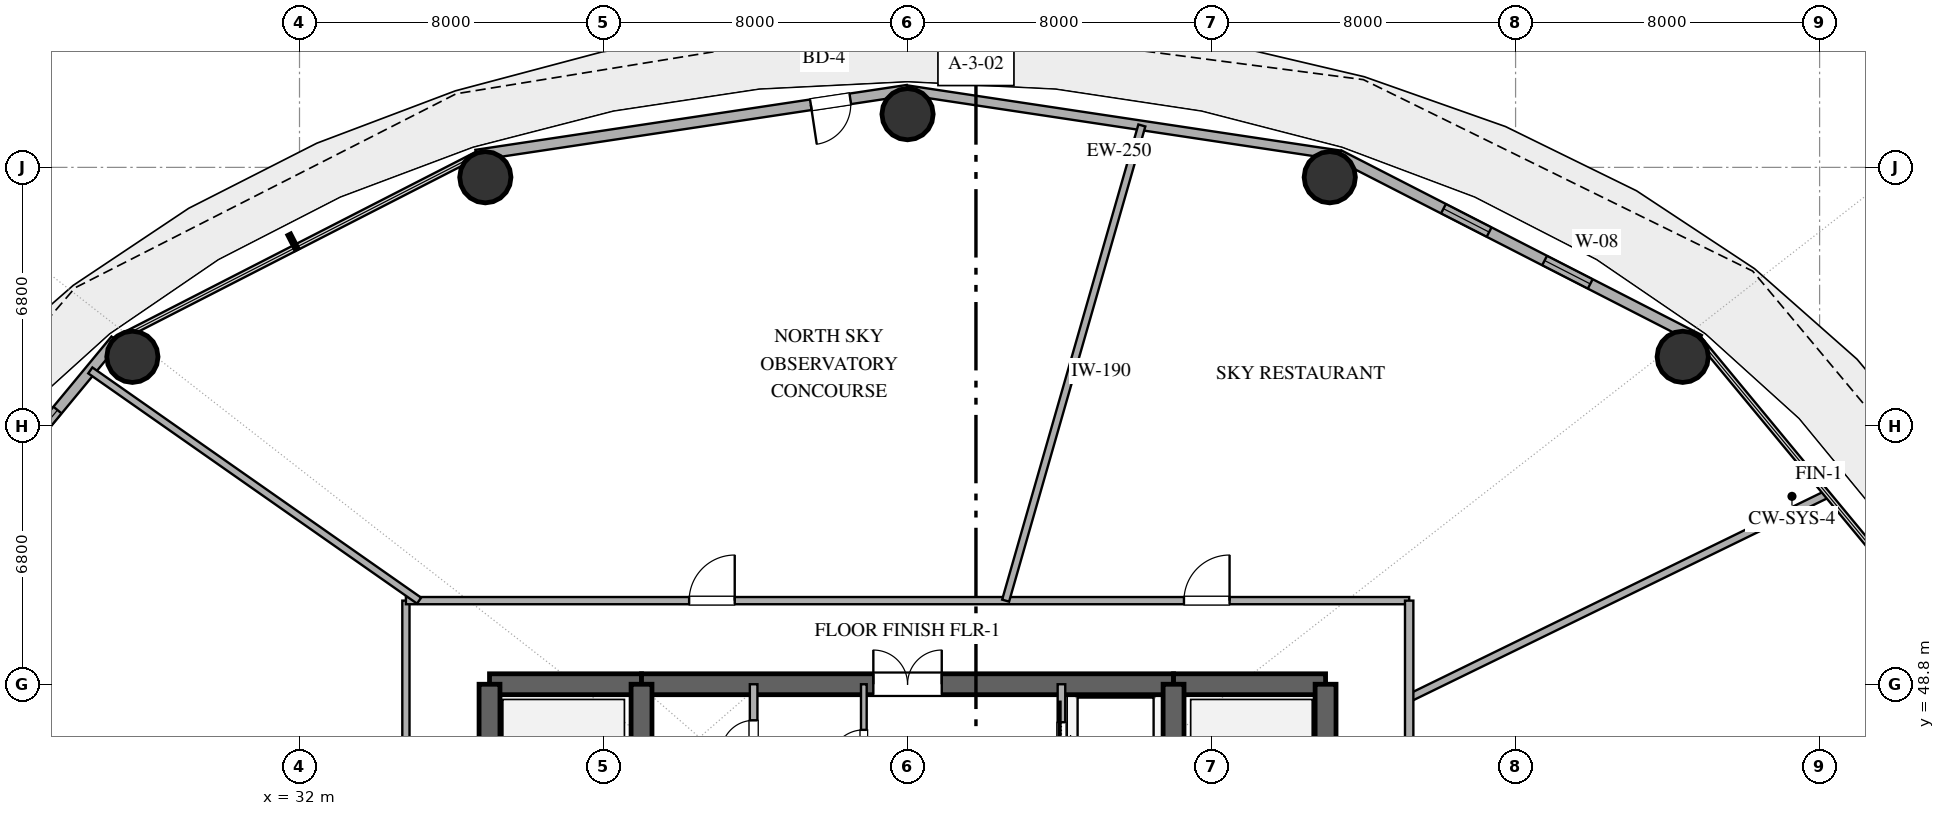
"""IFC4 building model, lengths in metres.
Left out: names, types, materials, properties, quantities, classifications, styles, units other than length and angle.
Written with IfcOpenShell. Run it as: python <this file> out.ifc"""

import sys

from ifc_helpers import new_model, si_unit, direction, frame, frame_2d, origin, origin_2d, place, context, subcontext, project, spatial, rectangle, hollow_circle, extrude, element, fill, save


model = new_model("IFC4")
c1 = context("Model", 3, precision=1e-05, world=origin(), true_north=direction((0.0, 1.0)))
c2 = subcontext(c1, "Body", "Model", "MODEL_VIEW")
j1 = project(units=[si_unit("LENGTHUNIT", "METRE"), si_unit("PLANEANGLEUNIT", "RADIAN")], contexts=[c1])
p1 = place(None, origin())
s1 = spatial("IfcSite", under=j1, at=p1, CompositionType="ELEMENT")
p2 = place(p1, origin())
s2 = spatial("IfcBuilding", under=s1, at=p2, CompositionType="ELEMENT")
p3 = place(p2, frame((0.0, 0.0, 134.4)))
s3 = spatial("IfcBuildingStorey", under=s2, at=p3, CompositionType="ELEMENT", Elevation=134.4)
p4 = place(p3, frame((37.0, 48.8, 0.0), z_axis=(0.0, 0.0, 1.0), x_axis=(1.0, 0.0, 0.0)))
e1 = element("IfcWall", 1, at=p4, inside=s3, PredefinedType="SHEAR", context=c2, shape_type="SweptSolid", body=[
    extrude(rectangle(XDim=4.0, YDim=0.55, at=frame_2d((2.0, 0.0))), origin(), (0.0, 0.0, 1.0), 5.05),
])
p5 = place(p3, frame((41.0, 48.8, 0.0), z_axis=(0.0, 0.0, 1.0), x_axis=(1.0, 0.0, 0.0)))
e2 = element("IfcWall", 2, at=p5, inside=s3, PredefinedType="SHEAR", context=c2, shape_type="SweptSolid", body=[
    extrude(rectangle(XDim=14.0, YDim=0.55, at=frame_2d((7.0, 0.0))), origin(), (0.0, 0.0, 1.0), 5.05),
])
p6 = place(p5, frame((6.1, 0.0, 0.0)))
e3 = element("IfcOpeningElement", 3, at=p6, cuts=e2, PredefinedType="OPENING", context=c2, shape_type="SweptSolid", body=[
    extrude(rectangle(XDim=1.8, YDim=2.25, at=frame_2d((0.9, 1.125))), frame((0.0, 0.285, 0.0), z_axis=(0.0, -1.0, 0.0), x_axis=(1.0, 0.0, 0.0)), (0.0, 0.0, 1.0), 0.57),
])
p7 = place(p3, frame((55.0, 48.8, 0.0), z_axis=(0.0, 0.0, 1.0), x_axis=(1.0, 0.0, 0.0)))
e4 = element("IfcWall", 4, at=p7, inside=s3, PredefinedType="SHEAR", context=c2, shape_type="SweptSolid", body=[
    extrude(rectangle(XDim=4.0, YDim=0.55, at=frame_2d((2.0, 0.0))), origin(), (0.0, 0.0, 1.0), 5.05),
])
p8 = place(p3, frame((37.0, 35.2, 0.0), z_axis=(0.0, 0.0, 1.0), x_axis=(0.0, 1.0, 0.0)))
e5 = element("IfcWall", 5, at=p8, inside=s3, PredefinedType="SHEAR", context=c2, shape_type="SweptSolid", body=[
    extrude(rectangle(XDim=13.6, YDim=0.55, at=frame_2d((6.8, 0.0))), origin(), (0.0, 0.0, 1.0), 5.05),
])
p9 = place(p8, frame((1.5, 0.0, 0.0)))
e6 = element("IfcOpeningElement", 6, at=p9, cuts=e5, PredefinedType="OPENING", context=c2, shape_type="SweptSolid", body=[
    extrude(rectangle(XDim=1.2, YDim=2.15, at=frame_2d((0.6, 1.075))), frame((0.0, 0.285, 0.0), z_axis=(0.0, -1.0, 0.0), x_axis=(1.0, 0.0, 0.0)), (0.0, 0.0, 1.0), 0.57),
])
p10 = place(p3, frame((59.0, 35.2, 0.0), z_axis=(0.0, 0.0, 1.0), x_axis=(0.0, 1.0, 0.0)))
e7 = element("IfcWall", 7, at=p10, inside=s3, PredefinedType="SHEAR", context=c2, shape_type="SweptSolid", body=[
    extrude(rectangle(XDim=13.6, YDim=0.55, at=frame_2d((6.8, 0.0))), origin(), (0.0, 0.0, 1.0), 5.05),
])
p11 = place(p10, frame((1.5, 0.0, 0.0)))
e8 = element("IfcOpeningElement", 8, at=p11, cuts=e7, PredefinedType="OPENING", context=c2, shape_type="SweptSolid", body=[
    extrude(rectangle(XDim=1.2, YDim=2.15, at=frame_2d((0.6, 1.075))), frame((0.0, 0.285, 0.0), z_axis=(0.0, -1.0, 0.0), x_axis=(1.0, 0.0, 0.0)), (0.0, 0.0, 1.0), 0.57),
])
p12 = place(p3, frame((41.0, 35.2, 0.0), z_axis=(0.0, 0.0, 1.0), x_axis=(0.0, 1.0, 0.0)))
e9 = element("IfcWall", 9, at=p12, inside=s3, PredefinedType="SHEAR", context=c2, shape_type="SweptSolid", body=[
    extrude(rectangle(XDim=13.6, YDim=0.55, at=frame_2d((6.8, 0.0))), origin(), (0.0, 0.0, 1.0), 5.05),
])
p13 = place(p12, frame((1.15, 0.0, 0.0)))
e10 = element("IfcOpeningElement", 10, at=p13, cuts=e9, PredefinedType="OPENING", context=c2, shape_type="SweptSolid", body=[
    extrude(rectangle(XDim=1.1, YDim=2.2, at=frame_2d((0.55, 1.1))), frame((0.0, 0.285, 0.0), z_axis=(0.0, -1.0, 0.0), x_axis=(1.0, 0.0, 0.0)), (0.0, 0.0, 1.0), 0.57),
])
p14 = place(p3, frame((55.0, 35.2, 0.0), z_axis=(0.0, 0.0, 1.0), x_axis=(0.0, 1.0, 0.0)))
e11 = element("IfcWall", 11, at=p14, inside=s3, PredefinedType="SHEAR", context=c2, shape_type="SweptSolid", body=[
    extrude(rectangle(XDim=13.6, YDim=0.55, at=frame_2d((6.8, 0.0))), origin(), (0.0, 0.0, 1.0), 5.05),
])
p15 = place(p14, frame((1.15, 0.0, 0.0)))
e12 = element("IfcOpeningElement", 12, at=p15, cuts=e11, PredefinedType="OPENING", context=c2, shape_type="SweptSolid", body=[
    extrude(rectangle(XDim=1.1, YDim=2.2, at=frame_2d((0.55, 1.1))), frame((0.0, 0.285, 0.0), z_axis=(0.0, -1.0, 0.0), x_axis=(1.0, 0.0, 0.0)), (0.0, 0.0, 1.0), 0.57),
])
for number, where, z_axis, x_axis in (
    (13, (68.398, 57.415, 0.0), (0.0, 0.0, 1.0), (1.0, 0.0, 0.0)),
    (14, (59.11, 62.141, 0.0), (0.0, 0.0, 1.0), (1.0, 0.0, 0.0)),
    (15, (48.0, 63.8, 0.0), (0.0, 0.0, 1.0), (1.0, 0.0, 0.0)),
    (16, (36.89, 62.141, 0.0), (0.0, 0.0, 1.0), (1.0, 0.0, 0.0)),
    (17, (27.602, 57.415, 0.0), (0.0, 0.0, 1.0), (1.0, 0.0, 0.0)),
):
    element("IfcColumn", number, at=place(p3, frame(where, z_axis=z_axis, x_axis=x_axis)), inside=s3, PredefinedType="COLUMN", context=c2, shape_type="SweptSolid", body=[
        extrude(hollow_circle(Radius=0.675, WallThickness=0.036, at=origin_2d()), origin(), (0.0, 0.0, 1.0), 5.05),
    ])
p16 = place(p3, frame((68.84, 57.86, 0.0), z_axis=(0.0, 0.0, 1.0), x_axis=(-0.889959505023, 0.45603955905, 0.0)))
e18 = element("IfcWall", 18, at=p16, inside=s3, PredefinedType="SOLIDWALL", context=c2, shape_type="SweptSolid", body=[
    extrude(rectangle(XDim=10.662, YDim=0.28, at=frame_2d((5.331, 0.0))), origin(), (0.0, 0.0, 1.0), 5.05),
])
p17 = place(p16, frame((3.231, 0.0, 0.85)))
e19 = element("IfcOpeningElement", 19, at=p17, cuts=e18, PredefinedType="OPENING", context=c2, shape_type="SweptSolid", body=[
    extrude(rectangle(XDim=1.35, YDim=1.8, at=frame_2d((0.675, 0.9))), frame((0.0, 0.15, 0.0), z_axis=(0.0, -1.0, 0.0), x_axis=(1.0, 0.0, 0.0)), (0.0, 0.0, 1.0), 0.3),
])
p18 = place(p16, frame((6.221, 0.0, 0.85)))
e20 = element("IfcOpeningElement", 20, at=p18, cuts=e18, PredefinedType="OPENING", context=c2, shape_type="SweptSolid", body=[
    extrude(rectangle(XDim=1.35, YDim=1.8, at=frame_2d((0.675, 0.9))), frame((0.0, 0.15, 0.0), z_axis=(0.0, -1.0, 0.0), x_axis=(1.0, 0.0, 0.0)), (0.0, 0.0, 1.0), 0.3),
])
p19 = place(p3, frame((59.351, 62.723, 0.0), z_axis=(0.0, 0.0, 1.0), x_axis=(-0.988877774656, 0.148730450117, 0.0)))
e21 = element("IfcWall", 21, at=p19, inside=s3, PredefinedType="SOLIDWALL", context=c2, shape_type="SweptSolid", body=[
    extrude(rectangle(XDim=11.479, YDim=0.25, at=frame_2d((5.74, 0.0))), origin(), (0.0, 0.0, 1.0), 5.05),
])
p20 = place(p3, frame((48.0, 64.43, 0.0), z_axis=(0.0, 0.0, 1.0), x_axis=(-0.988877774656, -0.148730450117, 0.0)))
e22 = element("IfcWall", 22, at=p20, inside=s3, PredefinedType="SOLIDWALL", context=c2, shape_type="SweptSolid", body=[
    extrude(rectangle(XDim=11.479, YDim=0.28, at=frame_2d((5.74, 0.0))), origin(), (0.0, 0.0, 1.0), 5.05),
])
p21 = place(p20, frame((1.524, 0.0, 0.0)))
e23 = element("IfcOpeningElement", 23, at=p21, cuts=e22, PredefinedType="OPENING", context=c2, shape_type="SweptSolid", body=[
    extrude(rectangle(XDim=1.05, YDim=2.2, at=frame_2d((0.525, 1.1))), frame((0.0, 0.15, 0.0), z_axis=(0.0, -1.0, 0.0), x_axis=(1.0, 0.0, 0.0)), (0.0, 0.0, 1.0), 0.3),
])
p22 = place(p3, frame((27.16, 57.86, 0.0), z_axis=(0.0, 0.0, 1.0), x_axis=(-0.637505817448, -0.770445541696, 0.0)))
e24 = element("IfcWall", 24, at=p22, inside=s3, PredefinedType="SOLIDWALL", context=c2, shape_type="SweptSolid", body=[
    extrude(rectangle(XDim=9.445, YDim=0.28, at=frame_2d((4.723, 0.0))), origin(), (0.0, 0.0, 1.0), 5.05),
])
p23 = place(p22, frame((2.396, 0.0, 0.85)))
e25 = element("IfcOpeningElement", 25, at=p23, cuts=e24, PredefinedType="OPENING", context=c2, shape_type="SweptSolid", body=[
    extrude(rectangle(XDim=1.8, YDim=2.2, at=frame_2d((0.9, 1.1))), frame((0.0, 0.15, 0.0), z_axis=(0.0, -1.0, 0.0), x_axis=(1.0, 0.0, 0.0)), (0.0, 0.0, 1.0), 0.3),
])
p24 = place(p22, frame((5.132, 0.0, 0.85)))
e26 = element("IfcOpeningElement", 26, at=p24, cuts=e24, PredefinedType="OPENING", context=c2, shape_type="SweptSolid", body=[
    extrude(rectangle(XDim=1.8, YDim=2.2, at=frame_2d((0.9, 1.1))), frame((0.0, 0.15, 0.0), z_axis=(0.0, -1.0, 0.0), x_axis=(1.0, 0.0, 0.0)), (0.0, 0.0, 1.0), 0.3),
])
p25 = place(p3, frame((43.95, 46.2, 0.0), z_axis=(0.0, 0.0, 1.0), x_axis=(0.0, 1.0, 0.0)))
e27 = element("IfcWall", 27, at=p25, inside=s3, PredefinedType="SOLIDWALL", context=c2, shape_type="SweptSolid", body=[
    extrude(rectangle(XDim=2.6, YDim=0.2, at=frame_2d((1.3, 0.0))), origin(), (0.0, 0.0, 1.0), 4.35),
])
p26 = place(p25, frame((0.8, 0.0, 0.0)))
e28 = element("IfcOpeningElement", 28, at=p26, cuts=e27, PredefinedType="OPENING", context=c2, shape_type="SweptSolid", body=[
    extrude(rectangle(XDim=0.85, YDim=2.15, at=frame_2d((0.425, 1.075))), frame((0.0, 0.11, 0.0), z_axis=(0.0, -1.0, 0.0), x_axis=(1.0, 0.0, 0.0)), (0.0, 0.0, 1.0), 0.22),
])
p27 = place(p3, frame((52.05, 38.4, 0.0), z_axis=(0.0, 0.0, 1.0), x_axis=(0.0, 1.0, 0.0)))
e29 = element("IfcWall", 29, at=p27, inside=s3, PredefinedType="SOLIDWALL", context=c2, shape_type="SweptSolid", body=[
    extrude(rectangle(XDim=10.4, YDim=0.2, at=frame_2d((5.2, 0.0))), origin(), (0.0, 0.0, 1.0), 4.35),
])
p28 = place(p27, frame((0.7, 0.0, 0.0)))
e30 = element("IfcOpeningElement", 30, at=p28, cuts=e29, PredefinedType="OPENING", context=c2, shape_type="SweptSolid", body=[
    extrude(rectangle(XDim=1.1, YDim=2.2, at=frame_2d((0.55, 1.1))), frame((0.0, 0.11, 0.0), z_axis=(0.0, -1.0, 0.0), x_axis=(1.0, 0.0, 0.0)), (0.0, 0.0, 1.0), 0.22),
])
p29 = place(p27, frame((3.2, 0.0, 0.0)))
e31 = element("IfcOpeningElement", 31, at=p29, cuts=e29, PredefinedType="OPENING", context=c2, shape_type="SweptSolid", body=[
    extrude(rectangle(XDim=1.1, YDim=2.2, at=frame_2d((0.55, 1.1))), frame((0.0, 0.11, 0.0), z_axis=(0.0, -1.0, 0.0), x_axis=(1.0, 0.0, 0.0)), (0.0, 0.0, 1.0), 0.22),
])
p30 = place(p27, frame((5.65, 0.0, 0.0)))
e32 = element("IfcOpeningElement", 32, at=p30, cuts=e29, PredefinedType="OPENING", context=c2, shape_type="SweptSolid", body=[
    extrude(rectangle(XDim=1.1, YDim=2.2, at=frame_2d((0.55, 1.1))), frame((0.0, 0.11, 0.0), z_axis=(0.0, -1.0, 0.0), x_axis=(1.0, 0.0, 0.0)), (0.0, 0.0, 1.0), 0.22),
])
p31 = place(p27, frame((8.2, 0.0, 0.0)))
e33 = element("IfcOpeningElement", 33, at=p31, cuts=e29, PredefinedType="OPENING", context=c2, shape_type="SweptSolid", body=[
    extrude(rectangle(XDim=1.2, YDim=2.2, at=frame_2d((0.6, 1.1))), frame((0.0, 0.11, 0.0), z_axis=(0.0, -1.0, 0.0), x_axis=(1.0, 0.0, 0.0)), (0.0, 0.0, 1.0), 0.22),
])
p32 = place(p3, frame((46.85, 45.65, 0.0), z_axis=(0.0, 0.0, 1.0), x_axis=(0.0, 1.0, 0.0)))
e34 = element("IfcWall", 34, at=p32, inside=s3, PredefinedType="PARTITIONING", context=c2, shape_type="SweptSolid", body=[
    extrude(rectangle(XDim=3.15, YDim=0.15, at=frame_2d((1.575, 0.0))), origin(), (0.0, 0.0, 1.0), 4.35),
])
p33 = place(p32, frame((1.05, 0.0, 0.0)))
e35 = element("IfcOpeningElement", 35, at=p33, cuts=e34, PredefinedType="OPENING", context=c2, shape_type="SweptSolid", body=[
    extrude(rectangle(XDim=0.9, YDim=2.15, at=frame_2d((0.45, 1.075))), frame((0.0, 0.085, 0.0), z_axis=(0.0, -1.0, 0.0), x_axis=(1.0, 0.0, 0.0)), (0.0, 0.0, 1.0), 0.17),
])
p34 = place(p3, frame((34.8, 33.0, 0.0), z_axis=(0.0, 0.0, 1.0), x_axis=(0.0, 1.0, 0.0)))
e36 = element("IfcWall", 36, at=p34, inside=s3, PredefinedType="PARTITIONING", context=c2, shape_type="SweptSolid", body=[
    extrude(rectangle(XDim=18.0, YDim=0.19, at=frame_2d((9.0, 0.0))), origin(), (0.0, 0.0, 1.0), 4.35),
])
p35 = place(p34, frame((8.4, 0.0, 0.0)))
e37 = element("IfcOpeningElement", 37, at=p35, cuts=e36, PredefinedType="OPENING", context=c2, shape_type="SweptSolid", body=[
    extrude(rectangle(XDim=1.2, YDim=2.25, at=frame_2d((0.6, 1.125))), frame((0.0, 0.105, 0.0), z_axis=(0.0, -1.0, 0.0), x_axis=(1.0, 0.0, 0.0)), (0.0, 0.0, 1.0), 0.21),
])
p36 = place(p3, frame((34.8, 51.0, 0.0), z_axis=(0.0, 0.0, 1.0), x_axis=(1.0, 0.0, 0.0)))
e38 = element("IfcWall", 38, at=p36, inside=s3, PredefinedType="PARTITIONING", context=c2, shape_type="SweptSolid", body=[
    extrude(rectangle(XDim=26.4, YDim=0.19, at=frame_2d((13.2, 0.0))), origin(), (0.0, 0.0, 1.0), 4.35),
])
p37 = place(p36, frame((7.452, 0.0, 0.0)))
e39 = element("IfcOpeningElement", 39, at=p37, cuts=e38, PredefinedType="OPENING", context=c2, shape_type="SweptSolid", body=[
    extrude(rectangle(XDim=1.2, YDim=2.25, at=frame_2d((0.6, 1.125))), frame((0.0, 0.105, 0.0), z_axis=(0.0, -1.0, 0.0), x_axis=(1.0, 0.0, 0.0)), (0.0, 0.0, 1.0), 0.21),
])
p38 = place(p36, frame((20.474, 0.0, 0.0)))
e40 = element("IfcOpeningElement", 40, at=p38, cuts=e38, PredefinedType="OPENING", context=c2, shape_type="SweptSolid", body=[
    extrude(rectangle(XDim=1.2, YDim=2.25, at=frame_2d((0.6, 1.125))), frame((0.0, 0.105, 0.0), z_axis=(0.0, -1.0, 0.0), x_axis=(1.0, 0.0, 0.0)), (0.0, 0.0, 1.0), 0.21),
])
p39 = place(p3, frame((54.166, 63.503, 0.0), z_axis=(0.0, 0.0, 1.0), x_axis=(-0.275628372198, -0.961264271904, 0.0)))
e41 = element("IfcWall", 41, at=p39, inside=s3, PredefinedType="PARTITIONING", context=c2, shape_type="SweptSolid", body=[
    extrude(rectangle(XDim=13.007, YDim=0.19, at=frame_2d((6.503, 0.0))), origin(), (0.0, 0.0, 1.0), 4.35),
])
p40 = place(p3, frame((72.198, 53.802, 0.0), z_axis=(0.0, 0.0, 1.0), x_axis=(-0.898789153873, -0.438381177608, 0.0)))
e42 = element("IfcWall", 42, at=p40, inside=s3, PredefinedType="PARTITIONING", context=c2, shape_type="SweptSolid", body=[
    extrude(rectangle(XDim=12.237, YDim=0.2, at=frame_2d((6.118, 0.0))), origin(), (0.0, 0.0, 1.0), 4.35),
])
p41 = place(p3, frame((35.147, 51.0, 0.0), z_axis=(0.0, 0.0, 1.0), x_axis=(-0.819150459782, 0.573578699255, 0.0)))
e43 = element("IfcWall", 43, at=p41, inside=s3, PredefinedType="PARTITIONING", context=c2, shape_type="SweptSolid", body=[
    extrude(rectangle(XDim=10.561, YDim=0.19, at=frame_2d((5.281, 0.0))), origin(), (0.0, 0.0, 1.0), 4.35),
])
p42 = place(p3, frame((61.2, 51.0, 0.0), z_axis=(0.0, 0.0, 1.0), x_axis=(0.0, -1.0, 0.0)))
e44 = element("IfcWall", 44, at=p42, inside=s3, PredefinedType="SOLIDWALL", context=c2, shape_type="SweptSolid", body=[
    extrude(rectangle(XDim=18.0, YDim=0.22, at=frame_2d((9.0, 0.0))), origin(), (0.0, 0.0, 1.0), 4.35),
])
p43 = place(p42, frame((11.911, 0.0, 0.0)))
e45 = element("IfcOpeningElement", 45, at=p43, cuts=e44, PredefinedType="OPENING", context=c2, shape_type="SweptSolid", body=[
    extrude(rectangle(XDim=1.2, YDim=2.25, at=frame_2d((0.6, 1.125))), frame((0.0, 0.12, 0.0), z_axis=(0.0, -1.0, 0.0), x_axis=(1.0, 0.0, 0.0)), (0.0, 0.0, 1.0), 0.24),
])
p44 = place(p42, frame((5.179, 0.0, 0.0)))
e46 = element("IfcOpeningElement", 46, at=p44, cuts=e44, PredefinedType="OPENING", context=c2, shape_type="SweptSolid", body=[
    extrude(rectangle(XDim=1.2, YDim=2.25, at=frame_2d((0.6, 1.125))), frame((0.0, 0.12, 0.0), z_axis=(0.0, -1.0, 0.0), x_axis=(1.0, 0.0, 0.0)), (0.0, 0.0, 1.0), 0.24),
])
p45 = place(p17, origin())
e47 = element("IfcWindow", 47, at=p45, inside=s3, PartitioningType="SINGLE_PANEL", PredefinedType="WINDOW", context=c2, shape_type="SweptSolid", body=[
    extrude(rectangle(XDim=1.35, YDim=1.8, at=frame_2d((0.675, 0.9))), frame((0.0, 0.03, 0.0), z_axis=(0.0, -1.0, 0.0), x_axis=(1.0, 0.0, 0.0)), (0.0, 0.0, 1.0), 0.06),
])
fill(e19, e47)
p46 = place(p18, origin())
e48 = element("IfcWindow", 48, at=p46, inside=s3, PartitioningType="SINGLE_PANEL", PredefinedType="WINDOW", context=c2, shape_type="SweptSolid", body=[
    extrude(rectangle(XDim=1.35, YDim=1.8, at=frame_2d((0.675, 0.9))), frame((0.0, 0.03, 0.0), z_axis=(0.0, -1.0, 0.0), x_axis=(1.0, 0.0, 0.0)), (0.0, 0.0, 1.0), 0.06),
])
fill(e20, e48)
p47 = place(p21, origin())
e49 = element("IfcDoor", 49, at=p47, inside=s3, OperationType="SINGLE_SWING_RIGHT", PredefinedType="DOOR", context=c2, shape_type="SweptSolid", body=[
    extrude(rectangle(XDim=1.05, YDim=2.2, at=frame_2d((0.525, 1.1))), frame((0.0, 0.025, 0.0), z_axis=(0.0, -1.0, 0.0), x_axis=(1.0, 0.0, 0.0)), (0.0, 0.0, 1.0), 0.05),
])
fill(e23, e49)
p48 = place(p23, origin())
e50 = element("IfcWindow", 50, at=p48, inside=s3, PartitioningType="SINGLE_PANEL", PredefinedType="WINDOW", context=c2, shape_type="SweptSolid", body=[
    extrude(rectangle(XDim=1.8, YDim=2.2, at=frame_2d((0.9, 1.1))), frame((0.0, 0.03, 0.0), z_axis=(0.0, -1.0, 0.0), x_axis=(1.0, 0.0, 0.0)), (0.0, 0.0, 1.0), 0.06),
])
fill(e25, e50)
p49 = place(p6, origin())
e51 = element("IfcDoor", 51, at=p49, inside=s3, OperationType="DOUBLE_DOOR_SINGLE_SWING", PredefinedType="DOOR", context=c2, shape_type="SweptSolid", body=[
    extrude(rectangle(XDim=1.8, YDim=2.25, at=frame_2d((0.9, 1.125))), frame((0.0, 0.025, 0.0), z_axis=(0.0, -1.0, 0.0), x_axis=(1.0, 0.0, 0.0)), (0.0, 0.0, 1.0), 0.05),
])
fill(e3, e51)
p50 = place(p26, origin())
e52 = element("IfcDoor", 52, at=p50, inside=s3, OperationType="SINGLE_SWING_LEFT", PredefinedType="DOOR", context=c2, shape_type="SweptSolid", body=[
    extrude(rectangle(XDim=0.85, YDim=2.15, at=frame_2d((0.425, 1.075))), frame((0.0, 0.025, 0.0), z_axis=(0.0, -1.0, 0.0), x_axis=(1.0, 0.0, 0.0)), (0.0, 0.0, 1.0), 0.05),
])
fill(e28, e52)
p51 = place(p31, origin())
e53 = element("IfcDoor", 53, at=p51, inside=s3, OperationType="SLIDING_TO_RIGHT", PredefinedType="DOOR", context=c2, shape_type="SweptSolid", body=[
    extrude(rectangle(XDim=1.2, YDim=2.2, at=frame_2d((0.6, 1.1))), frame((0.0, 0.025, 0.0), z_axis=(0.0, -1.0, 0.0), x_axis=(1.0, 0.0, 0.0)), (0.0, 0.0, 1.0), 0.05),
])
fill(e33, e53)
p52 = place(p33, origin())
e54 = element("IfcDoor", 54, at=p52, inside=s3, OperationType="SINGLE_SWING_LEFT", PredefinedType="DOOR", context=c2, shape_type="SweptSolid", body=[
    extrude(rectangle(XDim=0.9, YDim=2.15, at=frame_2d((0.45, 1.075))), frame((0.0, 0.025, 0.0), z_axis=(0.0, -1.0, 0.0), x_axis=(1.0, 0.0, 0.0)), (0.0, 0.0, 1.0), 0.05),
])
fill(e35, e54)
p53 = place(p37, origin())
e55 = element("IfcDoor", 55, at=p53, inside=s3, OperationType="SINGLE_SWING_RIGHT", PredefinedType="DOOR", context=c2, shape_type="SweptSolid", body=[
    extrude(rectangle(XDim=1.2, YDim=2.25, at=frame_2d((0.6, 1.125))), frame((0.0, 0.025, 0.0), z_axis=(0.0, -1.0, 0.0), x_axis=(1.0, 0.0, 0.0)), (0.0, 0.0, 1.0), 0.05),
])
fill(e39, e55)
p54 = place(p38, origin())
e56 = element("IfcDoor", 56, at=p54, inside=s3, OperationType="SINGLE_SWING_RIGHT", PredefinedType="DOOR", context=c2, shape_type="SweptSolid", body=[
    extrude(rectangle(XDim=1.2, YDim=2.25, at=frame_2d((0.6, 1.125))), frame((0.0, 0.025, 0.0), z_axis=(0.0, -1.0, 0.0), x_axis=(1.0, 0.0, 0.0)), (0.0, 0.0, 1.0), 0.05),
])
fill(e40, e56)
save(model, sys.argv[1])
